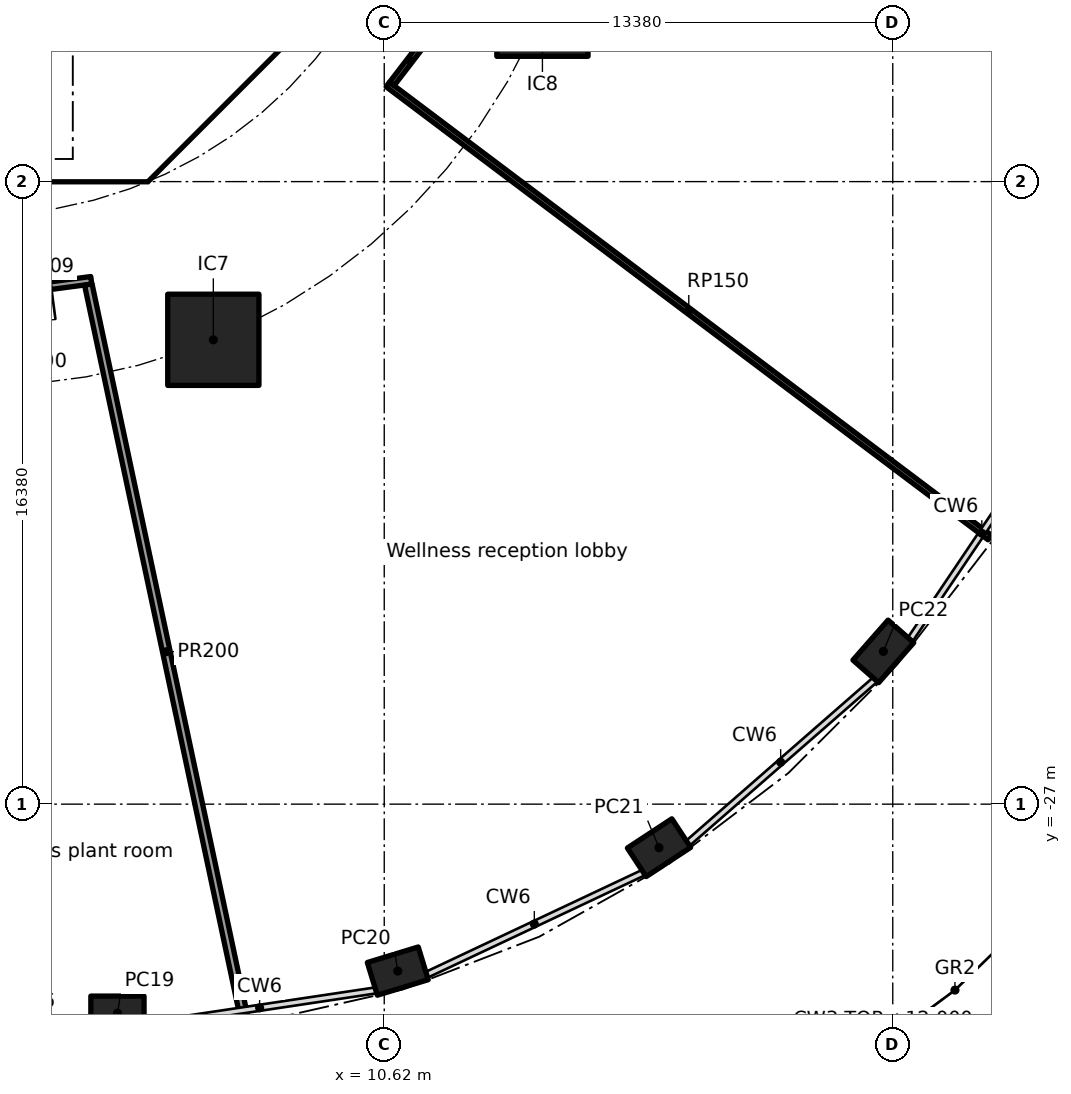
"""IFC4 building model, lengths in metres.
Left out: names, types, materials, properties, quantities, classifications, styles, units other than length and angle.
Written with IfcOpenShell. Run it as: python <this file> out.ifc"""

import sys

from ifc_helpers import new_model, si_unit, direction, frame, frame_2d, origin, origin_2d, place, context, subcontext, project, spatial, polyline, rectangle, hollow_rectangle, outline, extrude, element, fill, save


model = new_model("IFC4")
c1 = context("Model", 3, precision=1e-05, world=origin(), true_north=direction((0.0, 1.0)))
c2 = subcontext(c1, "Body", "Model", "MODEL_VIEW")
j1 = project(units=[si_unit("LENGTHUNIT", "METRE"), si_unit("PLANEANGLEUNIT", "RADIAN")], contexts=[c1])
p1 = place(None, origin())
s1 = spatial("IfcSite", under=j1, at=p1, CompositionType="ELEMENT")
p2 = place(p1, origin())
s2 = spatial("IfcBuilding", under=s1, at=p2, CompositionType="ELEMENT")
p3 = place(p2, frame((0.0, 0.0, 7.0)))
s3 = spatial("IfcBuildingStorey", under=s2, at=p3, CompositionType="ELEMENT", Elevation=7.0)
for number, where, z_axis, x_axis in (
    (1, (3.6, -32.5, 0.0), (0.0, 0.0, 1.0), (1.0, 0.0, 0.0)),
    (2, (10.976, -31.393, 0.0), (0.0, 0.0, 1.0), (0.957, 0.292, 0.0)),
    (3, (17.85, -28.146, 0.0), (0.0, 0.0, 1.0), (0.836, 0.549, 0.0)),
    (4, (23.752, -22.981, 0.0), (0.0, 0.0, 1.0), (0.66, 0.751, 0.0)),
):
    element("IfcColumn", number, at=place(p3, frame(where, z_axis=z_axis, x_axis=x_axis)), inside=s3, PredefinedType="COLUMN", context=c2, shape_type="SweptSolid", body=[
        extrude(hollow_rectangle(XDim=1.4, YDim=0.9, WallThickness=0.05, at=origin_2d()), origin(), (0.0, 0.0, 1.0), 5.0),
    ])
for number, where, z_axis, x_axis in (
    (5, (6.123, -14.782, 0.0), (0.0, 0.0, 1.0), (1.0, 0.0, 0.0)),
    (6, (14.782, -6.123, 0.0), (0.0, 0.0, 1.0), (1.0, 0.0, 0.0)),
):
    element("IfcColumn", number, at=place(p3, frame(where, z_axis=z_axis, x_axis=x_axis)), inside=s3, PredefinedType="COLUMN", context=c2, shape_type="SweptSolid", body=[
        extrude(rectangle(XDim=2.4, YDim=2.4, at=origin_2d()), origin(), (0.0, 0.0, 1.0), 5.0),
    ])
p4 = place(p3, frame((4.613, -9.988, 0.0), z_axis=(0.0, 0.0, 1.0), x_axis=(0.707106781187, 0.707106781187, 0.0)))
e7 = element("IfcWall", 7, at=p4, inside=s3, PredefinedType="SHEAR", context=c2, shape_type="SweptSolid", body=[
    extrude(rectangle(XDim=7.602, YDim=0.6, at=frame_2d((3.801, 0.0))), origin(), (0.0, 0.0, 1.0), 4.7),
])
p5 = place(p4, frame((3.201, 0.0, 0.0)))
e8 = element("IfcOpeningElement", 8, at=p5, cuts=e7, PredefinedType="OPENING", context=c2, shape_type="SweptSolid", body=[
    extrude(rectangle(XDim=1.2, YDim=2.1, at=frame_2d((0.6, 1.05))), frame((0.0, 0.31, 0.0), z_axis=(0.0, -1.0, 0.0), x_axis=(1.0, 0.0, 0.0)), (0.0, 0.0, 1.0), 0.62),
])
p6 = place(p3, frame((4.0, -10.025, 0.0), z_axis=(0.0, 0.0, 1.0), x_axis=(0.0, 1.0, 0.0)))
e9 = element("IfcWall", 9, at=p6, inside=s3, PredefinedType="SOLIDWALL", context=c2, shape_type="SweptSolid", body=[
    extrude(rectangle(XDim=3.0, YDim=0.2, at=frame_2d((1.5, 0.0))), origin(), (0.0, 0.0, 1.0), 4.7),
])
p7 = place(p6, frame((0.975, 0.0, 0.0)))
e10 = element("IfcOpeningElement", 10, at=p7, cuts=e9, PredefinedType="OPENING", context=c2, shape_type="SweptSolid", body=[
    extrude(rectangle(XDim=1.1, YDim=2.1, at=frame_2d((0.55, 1.05))), frame((0.0, 0.11, 0.0), z_axis=(0.0, -1.0, 0.0), x_axis=(1.0, 0.0, 0.0)), (0.0, 0.0, 1.0), 0.22),
])
p8 = place(p3, origin())
e11 = element("IfcWall", 11, at=p8, inside=s3, PredefinedType="SHEAR", context=c2, shape_type="SweptSolid", body=[
    extrude(outline(polyline([(-4.152, -10.025), (4.152, -10.025), (4.401, -9.776), (4.825, -10.2), (4.401, -10.625), (-4.401, -10.625), (-4.825, -10.2), (-4.401, -9.776), (-4.152, -10.025)])), origin(), (0.0, 0.0, 1.0), 4.7),
])
p9 = place(p3, frame((10.714, -8.064, 0.0), z_axis=(0.0, 0.0, 1.0), x_axis=(0.798982081461, -0.601354831612, 0.0)))
e12 = element("IfcWall", 12, at=p9, inside=s3, PredefinedType="PARTITIONING", context=c2, shape_type="SweptSolid", body=[
    extrude(rectangle(XDim=19.824, YDim=0.15, at=frame_2d((9.912, 0.0))), origin(), (0.0, 0.0, 1.0), 4.7),
])
p10 = place(p3, frame((11.771, -6.809, 0.0), z_axis=(0.0, 0.0, 1.0), x_axis=(-0.608736478404, -0.79337248494, 0.0)))
e13 = element("IfcWall", 13, at=p10, inside=s3, PredefinedType="PARTITIONING", context=c2, shape_type="SweptSolid", body=[
    extrude(rectangle(XDim=1.563, YDim=0.15, at=frame_2d((0.781, 0.0))), origin(), (0.0, 0.0, 1.0), 4.7),
])
p11 = place(p3, frame((2.912, -13.217, 0.0), z_axis=(0.0, 0.0, 1.0), x_axis=(-0.991454864412, -0.130450189089, 0.0)))
e14 = element("IfcWall", 14, at=p11, inside=s3, PredefinedType="PARTITIONING", context=c2, shape_type="SweptSolid", body=[
    extrude(rectangle(XDim=2.921, YDim=0.2, at=frame_2d((1.461, 0.0))), origin(), (0.0, 0.0, 1.0), 4.7),
])
p12 = place(p11, frame((1.069, 0.0, 0.0)))
e15 = element("IfcOpeningElement", 15, at=p12, cuts=e14, PredefinedType="OPENING", context=c2, shape_type="SweptSolid", body=[
    extrude(rectangle(XDim=0.9, YDim=2.1, at=frame_2d((0.45, 1.05))), frame((0.0, 0.11, 0.0), z_axis=(0.0, -1.0, 0.0), x_axis=(1.0, 0.0, 0.0)), (0.0, 0.0, 1.0), 0.22),
])
p13 = place(p3, frame((6.94, -32.651, 0.0), z_axis=(0.0, 0.0, 1.0), x_axis=(-0.207911671545, 0.97814760483, 0.0)))
e16 = element("IfcWall", 16, at=p13, inside=s3, PredefinedType="PARTITIONING", context=c2, shape_type="SweptSolid", body=[
    extrude(rectangle(XDim=19.754, YDim=0.2, at=frame_2d((9.877, 0.0))), origin(), (0.0, 0.0, 1.0), 4.7),
])
p14 = place(p7, origin())
e17 = element("IfcDoor", 17, at=p14, inside=s3, OperationType="SINGLE_SWING_LEFT", PredefinedType="DOOR", context=c2, shape_type="SweptSolid", body=[
    extrude(rectangle(XDim=1.1, YDim=2.1, at=frame_2d((0.55, 1.05))), frame((0.0, 0.025, 0.0), z_axis=(0.0, -1.0, 0.0), x_axis=(1.0, 0.0, 0.0)), (0.0, 0.0, 1.0), 0.05),
])
fill(e10, e17)
p15 = place(p5, origin())
e18 = element("IfcDoor", 18, at=p15, inside=s3, OperationType="SINGLE_SWING_LEFT", PredefinedType="DOOR", context=c2, shape_type="SweptSolid", body=[
    extrude(rectangle(XDim=1.2, YDim=2.1, at=frame_2d((0.6, 1.05))), frame((0.0, 0.025, 0.0), z_axis=(0.0, -1.0, 0.0), x_axis=(1.0, 0.0, 0.0)), (0.0, 0.0, 1.0), 0.05),
])
fill(e8, e18)
save(model, sys.argv[1])
